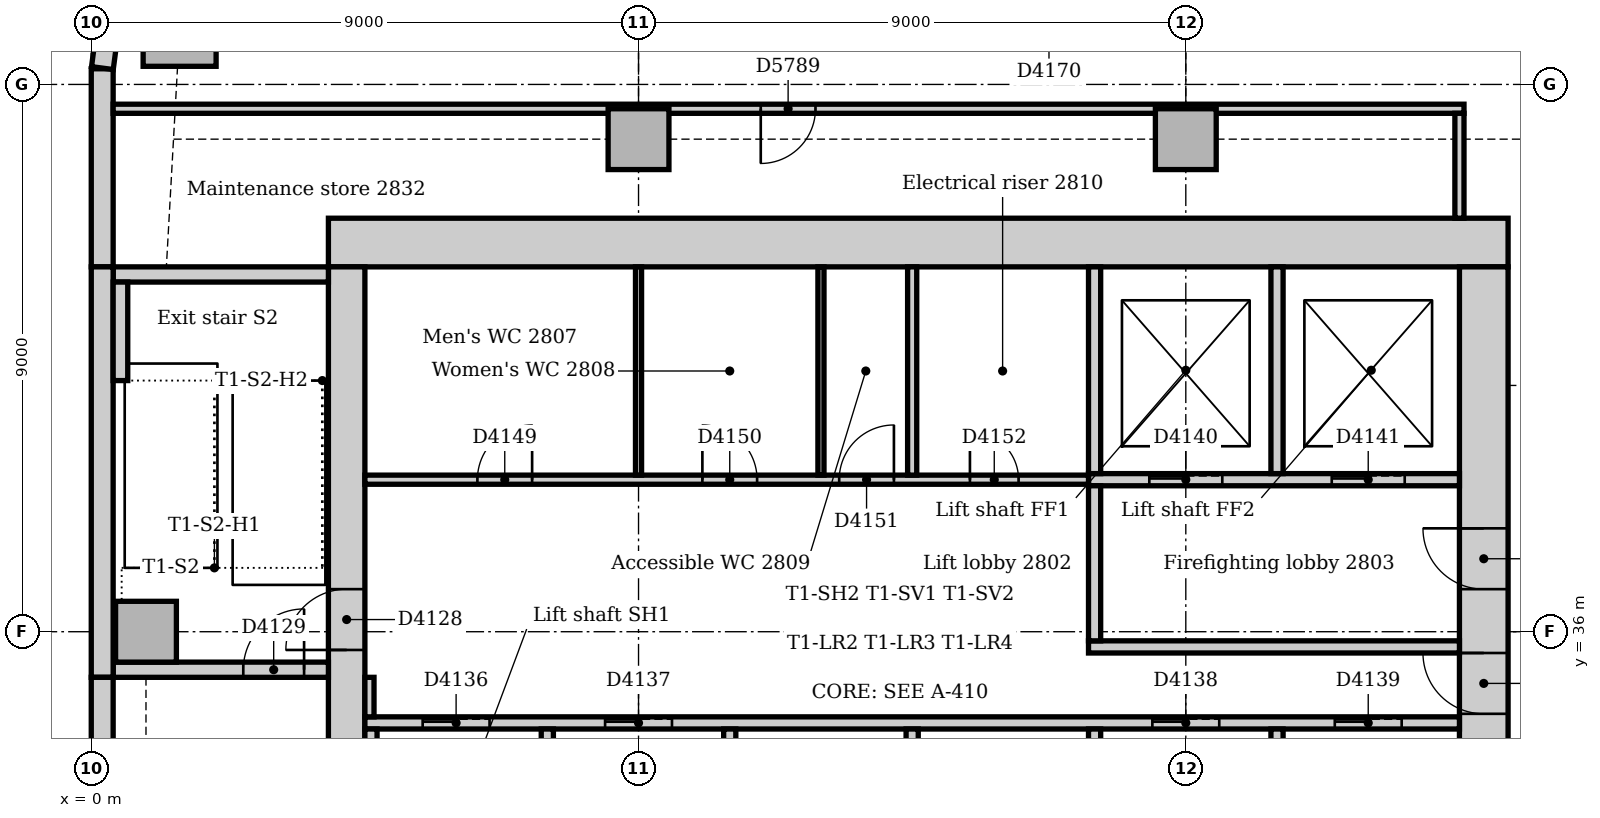
"""IFC4 building model, lengths in metres.
Left out: names, types, materials, properties, quantities, classifications, styles, units other than length and angle.
Written with IfcOpenShell. Run it as: python <this file> out.ifc"""

import sys

from ifc_helpers import new_model, si_unit, direction, frame, frame_2d, origin, origin_2d, place, context, subcontext, project, spatial, rectangle, extrude, element, fill, save


model = new_model("IFC4")
c1 = context("Model", 3, precision=1e-05, world=origin(), true_north=direction((0.0, 1.0)))
c2 = subcontext(c1, "Body", "Model", "MODEL_VIEW")
j1 = project(units=[si_unit("LENGTHUNIT", "METRE"), si_unit("PLANEANGLEUNIT", "RADIAN")], contexts=[c1])
p1 = place(None, origin())
s1 = spatial("IfcSite", under=j1, at=p1, CompositionType="ELEMENT")
p2 = place(p1, origin())
s2 = spatial("IfcBuilding", under=s1, at=p2, CompositionType="ELEMENT")
p3 = place(p2, frame((0.0, 0.0, 120.0)))
s3 = spatial("IfcBuildingStorey", under=s2, at=p3, CompositionType="ELEMENT", Elevation=120.0)
p4 = place(p3, frame((23.3, 42.4, 0.0), z_axis=(0.0, 0.0, 1.0), x_axis=(-1.0, 0.0, 0.0)))
e1 = element("IfcWall", 1, at=p4, inside=s3, PredefinedType="SOLIDWALL", context=c2, shape_type="SweptSolid", body=[
    extrude(rectangle(XDim=19.4, YDim=0.8, at=frame_2d((9.7, 0.0))), origin(), (0.0, 0.0, 1.0), 4.0),
])
p5 = place(p3, frame((22.9, 31.5, 0.0), z_axis=(0.0, 0.0, 1.0), x_axis=(0.0, 1.0, 0.0)))
e2 = element("IfcWall", 2, at=p5, inside=s3, PredefinedType="SOLIDWALL", context=c2, shape_type="SweptSolid", body=[
    extrude(rectangle(XDim=10.5, YDim=0.8, at=frame_2d((5.25, 0.0))), origin(), (0.0, 0.0, 1.0), 4.0),
])
p6 = place(p5, frame((3.15, 0.0, 0.0)))
e3 = element("IfcOpeningElement", 3, at=p6, cuts=e2, PredefinedType="OPENING", context=c2, shape_type="SweptSolid", body=[
    extrude(rectangle(XDim=1.0, YDim=2.1, at=frame_2d((0.5, 1.05))), frame((0.0, 0.41, 0.0), z_axis=(0.0, -1.0, 0.0), x_axis=(1.0, 0.0, 0.0)), (0.0, 0.0, 1.0), 0.82),
])
p7 = place(p5, frame((5.2, 0.0, 0.0)))
e4 = element("IfcOpeningElement", 4, at=p7, cuts=e2, PredefinedType="OPENING", context=c2, shape_type="SweptSolid", body=[
    extrude(rectangle(XDim=1.0, YDim=2.1, at=frame_2d((0.5, 1.05))), frame((0.0, 0.41, 0.0), z_axis=(0.0, -1.0, 0.0), x_axis=(1.0, 0.0, 0.0)), (0.0, 0.0, 1.0), 0.82),
])
p8 = place(p3, frame((4.2, 42.0, 0.0), z_axis=(0.0, 0.0, 1.0), x_axis=(0.0, -1.0, 0.0)))
e5 = element("IfcWall", 5, at=p8, inside=s3, PredefinedType="SOLIDWALL", context=c2, shape_type="SweptSolid", body=[
    extrude(rectangle(XDim=10.5, YDim=0.6, at=frame_2d((5.25, 0.0))), origin(), (0.0, 0.0, 1.0), 4.0),
])
p9 = place(p8, frame((5.3, 0.0, 0.0)))
e6 = element("IfcOpeningElement", 6, at=p9, cuts=e5, PredefinedType="OPENING", context=c2, shape_type="SweptSolid", body=[
    extrude(rectangle(XDim=1.0, YDim=2.1, at=frame_2d((0.5, 1.05))), frame((0.0, 0.31, 0.0), z_axis=(0.0, -1.0, 0.0), x_axis=(1.0, 0.0, 0.0)), (0.0, 0.0, 1.0), 0.62),
])
p10 = place(p3, frame((0.36, 35.375, 0.0), z_axis=(0.0, 0.0, 1.0), x_axis=(1.0, 0.0, 0.0)))
e7 = element("IfcWall", 7, at=p10, inside=s3, PredefinedType="SOLIDWALL", context=c2, shape_type="SweptSolid", body=[
    extrude(rectangle(XDim=3.54, YDim=0.25, at=frame_2d((1.77, 0.0))), origin(), (0.0, 0.0, 1.0), 4.0),
])
p11 = place(p10, frame((2.14, 0.0, 0.0)))
e8 = element("IfcOpeningElement", 8, at=p11, cuts=e7, PredefinedType="OPENING", context=c2, shape_type="SweptSolid", body=[
    extrude(rectangle(XDim=1.0, YDim=2.1, at=frame_2d((0.5, 1.05))), frame((0.0, 0.135, 0.0), z_axis=(0.0, -1.0, 0.0), x_axis=(1.0, 0.0, 0.0)), (0.0, 0.0, 1.0), 0.27),
])
p12 = place(p3, frame((3.9, 41.875, 0.0), z_axis=(0.0, 0.0, 1.0), x_axis=(-1.0, 0.0, 0.0)))
e9 = element("IfcWall", 9, at=p12, inside=s3, PredefinedType="SOLIDWALL", context=c2, shape_type="SweptSolid", body=[
    extrude(rectangle(XDim=3.54, YDim=0.25, at=frame_2d((1.77, 0.0))), origin(), (0.0, 0.0, 1.0), 4.0),
])
p13 = place(p3, frame((1.453, 45.898, 0.0), z_axis=(0.0, 0.0, 1.0), x_axis=(1.0, 0.0, 0.0)))
e10 = element("IfcColumn", 10, at=p13, inside=s3, PredefinedType="COLUMN", context=c2, shape_type="SweptSolid", body=[
    extrude(rectangle(XDim=1.2, YDim=1.2, at=origin_2d()), origin(), (0.0, 0.0, 1.0), 3.85),
])
p14 = place(p3, frame((0.9, 36.0, 0.0), z_axis=(0.0, 0.0, 1.0), x_axis=(1.0, 0.0, 0.0)))
e11 = element("IfcColumn", 11, at=p14, inside=s3, PredefinedType="COLUMN", context=c2, shape_type="SweptSolid", body=[
    extrude(rectangle(XDim=1.0, YDim=1.0, at=origin_2d()), origin(), (0.0, 0.0, 1.0), 4.0),
])
for number, where, z_axis, x_axis in (
    (12, (9.0, 44.1, 0.0), (0.0, 0.0, 1.0), (1.0, 0.0, 0.0)),
    (13, (18.0, 44.1, 0.0), (0.0, 0.0, 1.0), (1.0, 0.0, 0.0)),
):
    element("IfcColumn", number, at=place(p3, frame(where, z_axis=z_axis, x_axis=x_axis)), inside=s3, PredefinedType="COLUMN", context=c2, shape_type="SweptSolid", body=[
        extrude(rectangle(XDim=1.0, YDim=1.0, at=origin_2d()), origin(), (0.0, 0.0, 1.0), 3.85),
    ])
p15 = place(p3, frame((0.18, 45.257, 0.0), z_axis=(0.0, 0.0, 1.0), x_axis=(0.0, -1.0, 0.0)))
e14 = element("IfcWall", 14, at=p15, inside=s3, PredefinedType="STANDARD", context=c2, shape_type="SweptSolid", body=[
    extrude(rectangle(XDim=3.257, YDim=0.36, at=frame_2d((1.629, 0.0))), origin(), (0.0, 0.0, 1.0), 3.85),
])
p16 = place(p3, frame((0.18, 42.0, 0.0), z_axis=(0.0, 0.0, 1.0), x_axis=(0.0, -1.0, 0.0)))
e15 = element("IfcWall", 15, at=p16, inside=s3, PredefinedType="STANDARD", context=c2, shape_type="SweptSolid", body=[
    extrude(rectangle(XDim=6.75, YDim=0.36, at=frame_2d((3.375, 0.0))), origin(), (0.0, 0.0, 1.0), 3.85),
])
p17 = place(p3, frame((0.18, 35.25, 0.0), z_axis=(0.0, 0.0, 1.0), x_axis=(0.0, -1.0, 0.0)))
e16 = element("IfcWall", 16, at=p17, inside=s3, PredefinedType="STANDARD", context=c2, shape_type="SweptSolid", body=[
    extrude(rectangle(XDim=7.5, YDim=0.36, at=frame_2d((3.75, 0.0))), origin(), (0.0, 0.0, 1.0), 3.85),
])
p18 = place(p3, frame((0.276, 45.976, 0.0), z_axis=(0.0, 0.0, 1.0), x_axis=(-0.13055608231, -0.99144092581, 0.0)))
e17 = element("IfcWall", 17, at=p18, inside=s3, PredefinedType="STANDARD", context=c2, shape_type="SweptSolid", body=[
    extrude(rectangle(XDim=0.713, YDim=0.36, at=frame_2d((0.356, 0.0))), origin(), (0.0, 0.0, 1.0), 3.85),
])
p19 = place(p3, frame((0.48, 40.13, 0.0), z_axis=(0.0, 0.0, 1.0), x_axis=(0.0, 1.0, 0.0)))
e18 = element("IfcWall", 18, at=p19, inside=s3, PredefinedType="STANDARD", context=c2, shape_type="SweptSolid", body=[
    extrude(rectangle(XDim=1.62, YDim=0.24, at=frame_2d((0.81, 0.0))), origin(), (0.0, 0.0, 1.0), 4.0),
])
p20 = place(p3, frame((16.4, 35.75, 0.0), z_axis=(0.0, 0.0, 1.0), x_axis=(1.0, 0.0, 0.0)))
e19 = element("IfcWall", 19, at=p20, inside=s3, PredefinedType="PARTITIONING", context=c2, shape_type="SweptSolid", body=[
    extrude(rectangle(XDim=6.1, YDim=0.2, at=frame_2d((3.05, 0.0))), origin(), (0.0, 0.0, 1.0), 3.85),
])
p21 = place(p3, frame((16.4, 38.5, 0.0), z_axis=(0.0, 0.0, 1.0), x_axis=(1.0, 0.0, 0.0)))
e20 = element("IfcWall", 20, at=p21, inside=s3, PredefinedType="PARTITIONING", context=c2, shape_type="SweptSolid", body=[
    extrude(rectangle(XDim=6.1, YDim=0.2, at=frame_2d((3.05, 0.0))), origin(), (0.0, 0.0, 1.0), 3.85),
])
p22 = place(p21, frame((1.0, 0.0, 0.0)))
e21 = element("IfcOpeningElement", 21, at=p22, cuts=e20, PredefinedType="OPENING", context=c2, shape_type="SweptSolid", body=[
    extrude(rectangle(XDim=1.2, YDim=2.1, at=frame_2d((0.6, 1.05))), frame((0.0, 0.11, 0.0), z_axis=(0.0, -1.0, 0.0), x_axis=(1.0, 0.0, 0.0)), (0.0, 0.0, 1.0), 0.22),
])
p23 = place(p21, frame((4.0, 0.0, 0.0)))
e22 = element("IfcOpeningElement", 22, at=p23, cuts=e20, PredefinedType="OPENING", context=c2, shape_type="SweptSolid", body=[
    extrude(rectangle(XDim=1.2, YDim=2.1, at=frame_2d((0.6, 1.05))), frame((0.0, 0.11, 0.0), z_axis=(0.0, -1.0, 0.0), x_axis=(1.0, 0.0, 0.0)), (0.0, 0.0, 1.0), 0.22),
])
p24 = place(p3, frame((16.5, 35.85, 0.0), z_axis=(0.0, 0.0, 1.0), x_axis=(0.0, 1.0, 0.0)))
e23 = element("IfcWall", 23, at=p24, inside=s3, PredefinedType="PARTITIONING", context=c2, shape_type="SweptSolid", body=[
    extrude(rectangle(XDim=2.55, YDim=0.2, at=frame_2d((1.275, 0.0))), origin(), (0.0, 0.0, 1.0), 3.85),
])
p25 = place(p3, frame((4.5, 34.5, 0.0), z_axis=(0.0, 0.0, 1.0), x_axis=(1.0, 0.0, 0.0)))
e24 = element("IfcWall", 24, at=p25, inside=s3, PredefinedType="PARTITIONING", context=c2, shape_type="SweptSolid", body=[
    extrude(rectangle(XDim=18.0, YDim=0.2, at=frame_2d((9.0, 0.0))), origin(), (0.0, 0.0, 1.0), 3.85),
])
p26 = place(p25, frame((0.95, 0.0, 0.0)))
e25 = element("IfcOpeningElement", 25, at=p26, cuts=e24, PredefinedType="OPENING", context=c2, shape_type="SweptSolid", body=[
    extrude(rectangle(XDim=1.1, YDim=2.1, at=frame_2d((0.55, 1.05))), frame((0.0, 0.11, 0.0), z_axis=(0.0, -1.0, 0.0), x_axis=(1.0, 0.0, 0.0)), (0.0, 0.0, 1.0), 0.22),
])
p27 = place(p25, frame((3.95, 0.0, 0.0)))
e26 = element("IfcOpeningElement", 26, at=p27, cuts=e24, PredefinedType="OPENING", context=c2, shape_type="SweptSolid", body=[
    extrude(rectangle(XDim=1.1, YDim=2.1, at=frame_2d((0.55, 1.05))), frame((0.0, 0.11, 0.0), z_axis=(0.0, -1.0, 0.0), x_axis=(1.0, 0.0, 0.0)), (0.0, 0.0, 1.0), 0.22),
])
p28 = place(p25, frame((12.95, 0.0, 0.0)))
e27 = element("IfcOpeningElement", 27, at=p28, cuts=e24, PredefinedType="OPENING", context=c2, shape_type="SweptSolid", body=[
    extrude(rectangle(XDim=1.1, YDim=2.1, at=frame_2d((0.55, 1.05))), frame((0.0, 0.11, 0.0), z_axis=(0.0, -1.0, 0.0), x_axis=(1.0, 0.0, 0.0)), (0.0, 0.0, 1.0), 0.22),
])
p29 = place(p25, frame((15.95, 0.0, 0.0)))
e28 = element("IfcOpeningElement", 28, at=p29, cuts=e24, PredefinedType="OPENING", context=c2, shape_type="SweptSolid", body=[
    extrude(rectangle(XDim=1.1, YDim=2.1, at=frame_2d((0.55, 1.05))), frame((0.0, 0.11, 0.0), z_axis=(0.0, -1.0, 0.0), x_axis=(1.0, 0.0, 0.0)), (0.0, 0.0, 1.0), 0.22),
])
for number, where, z_axis, x_axis in (
    (29, (16.5, 38.6, 0.0), (0.0, 0.0, 1.0), (0.0, 1.0, 0.0)),
    (30, (19.5, 38.6, 0.0), (0.0, 0.0, 1.0), (0.0, 1.0, 0.0)),
):
    element("IfcWall", number, at=place(p3, frame(where, z_axis=z_axis, x_axis=x_axis)), inside=s3, PredefinedType="PARTITIONING", context=c2, shape_type="SweptSolid", body=[
        extrude(rectangle(XDim=3.4, YDim=0.2, at=frame_2d((1.7, 0.0))), origin(), (0.0, 0.0, 1.0), 3.85),
    ])
for number, where, z_axis, x_axis in (
    (31, (4.6, 31.75, 0.0), (0.0, 0.0, 1.0), (0.0, 1.0, 0.0)),
    (32, (7.5, 31.75, 0.0), (0.0, 0.0, 1.0), (0.0, 1.0, 0.0)),
    (33, (10.5, 31.75, 0.0), (0.0, 0.0, 1.0), (0.0, 1.0, 0.0)),
    (34, (13.5, 31.75, 0.0), (0.0, 0.0, 1.0), (0.0, 1.0, 0.0)),
    (35, (16.5, 31.75, 0.0), (0.0, 0.0, 1.0), (0.0, 1.0, 0.0)),
    (36, (19.5, 31.75, 0.0), (0.0, 0.0, 1.0), (0.0, 1.0, 0.0)),
):
    element("IfcWall", number, at=place(p3, frame(where, z_axis=z_axis, x_axis=x_axis)), inside=s3, PredefinedType="PARTITIONING", context=c2, shape_type="SweptSolid", body=[
        extrude(rectangle(XDim=2.65, YDim=0.2, at=frame_2d((1.325, 0.0))), origin(), (0.0, 0.0, 1.0), 3.85),
    ])
p30 = place(p3, frame((0.36, 44.6, 0.0), z_axis=(0.0, 0.0, 1.0), x_axis=(1.0, 0.0, 0.0)))
e37 = element("IfcWall", 37, at=p30, inside=s3, PredefinedType="PARTITIONING", context=c2, shape_type="SweptSolid", body=[
    extrude(rectangle(XDim=22.215, YDim=0.15, at=frame_2d((11.107, 0.0))), origin(), (0.0, 0.0, 1.0), 3.85),
])
p31 = place(p30, frame((10.65, 0.0, 0.0)))
e38 = element("IfcOpeningElement", 38, at=p31, cuts=e37, PredefinedType="OPENING", context=c2, shape_type="SweptSolid", body=[
    extrude(rectangle(XDim=0.9, YDim=2.1, at=frame_2d((0.45, 1.05))), frame((0.0, 0.085, 0.0), z_axis=(0.0, -1.0, 0.0), x_axis=(1.0, 0.0, 0.0)), (0.0, 0.0, 1.0), 0.17),
])
p32 = place(p3, frame((4.5, 38.5, 0.0), z_axis=(0.0, 0.0, 1.0), x_axis=(1.0, 0.0, 0.0)))
e39 = element("IfcWall", 39, at=p32, inside=s3, PredefinedType="PARTITIONING", context=c2, shape_type="SweptSolid", body=[
    extrude(rectangle(XDim=11.9, YDim=0.15, at=frame_2d((5.95, 0.0))), origin(), (0.0, 0.0, 1.0), 3.85),
])
p33 = place(p32, frame((1.85, 0.0, 0.0)))
e40 = element("IfcOpeningElement", 40, at=p33, cuts=e39, PredefinedType="OPENING", context=c2, shape_type="SweptSolid", body=[
    extrude(rectangle(XDim=0.9, YDim=2.1, at=frame_2d((0.45, 1.05))), frame((0.0, 0.085, 0.0), z_axis=(0.0, -1.0, 0.0), x_axis=(1.0, 0.0, 0.0)), (0.0, 0.0, 1.0), 0.17),
])
p34 = place(p32, frame((5.55, 0.0, 0.0)))
e41 = element("IfcOpeningElement", 41, at=p34, cuts=e39, PredefinedType="OPENING", context=c2, shape_type="SweptSolid", body=[
    extrude(rectangle(XDim=0.9, YDim=2.1, at=frame_2d((0.45, 1.05))), frame((0.0, 0.085, 0.0), z_axis=(0.0, -1.0, 0.0), x_axis=(1.0, 0.0, 0.0)), (0.0, 0.0, 1.0), 0.17),
])
p35 = place(p32, frame((7.8, 0.0, 0.0)))
e42 = element("IfcOpeningElement", 42, at=p35, cuts=e39, PredefinedType="OPENING", context=c2, shape_type="SweptSolid", body=[
    extrude(rectangle(XDim=0.9, YDim=2.1, at=frame_2d((0.45, 1.05))), frame((0.0, 0.085, 0.0), z_axis=(0.0, -1.0, 0.0), x_axis=(1.0, 0.0, 0.0)), (0.0, 0.0, 1.0), 0.17),
])
p36 = place(p32, frame((9.95, 0.0, 0.0)))
e43 = element("IfcOpeningElement", 43, at=p36, cuts=e39, PredefinedType="OPENING", context=c2, shape_type="SweptSolid", body=[
    extrude(rectangle(XDim=0.8, YDim=2.1, at=frame_2d((0.4, 1.05))), frame((0.0, 0.085, 0.0), z_axis=(0.0, -1.0, 0.0), x_axis=(1.0, 0.0, 0.0)), (0.0, 0.0, 1.0), 0.17),
])
p37 = place(p3, frame((22.5, 42.8, 0.0), z_axis=(0.0, 0.0, 1.0), x_axis=(0.0, 1.0, 0.0)))
e44 = element("IfcWall", 44, at=p37, inside=s3, PredefinedType="PARTITIONING", context=c2, shape_type="SweptSolid", body=[
    extrude(rectangle(XDim=1.725, YDim=0.15, at=frame_2d((0.863, 0.0))), origin(), (0.0, 0.0, 1.0), 3.85),
])
p38 = place(p3, frame((4.575, 34.6, 0.0), z_axis=(0.0, 0.0, 1.0), x_axis=(0.0, 1.0, 0.0)))
e45 = element("IfcWall", 45, at=p38, inside=s3, PredefinedType="PARTITIONING", context=c2, shape_type="SweptSolid", body=[
    extrude(rectangle(XDim=0.65, YDim=0.15, at=frame_2d((0.325, 0.0))), origin(), (0.0, 0.0, 1.0), 3.85),
])
p39 = place(p3, frame((13.5, 38.575, 0.0), z_axis=(0.0, 0.0, 1.0), x_axis=(0.0, 1.0, 0.0)))
e46 = element("IfcWall", 46, at=p39, inside=s3, PredefinedType="PARTITIONING", context=c2, shape_type="SweptSolid", body=[
    extrude(rectangle(XDim=3.425, YDim=0.15, at=frame_2d((1.712, 0.0))), origin(), (0.0, 0.0, 1.0), 3.85),
])
for number, where, z_axis, x_axis in (
    (47, (9.0, 38.575, 0.0), (0.0, 0.0, 1.0), (0.0, 1.0, 0.0)),
    (48, (12.0, 38.575, 0.0), (0.0, 0.0, 1.0), (0.0, 1.0, 0.0)),
):
    element("IfcWall", number, at=place(p3, frame(where, z_axis=z_axis, x_axis=x_axis)), inside=s3, PredefinedType="PARTITIONING", context=c2, shape_type="SweptSolid", body=[
        extrude(rectangle(XDim=3.425, YDim=0.1, at=frame_2d((1.712, 0.0))), origin(), (0.0, 0.0, 1.0), 3.85),
    ])
p40 = place(p9, frame((1.0, 0.0, 0.0), z_axis=(0.0, 0.0, 1.0), x_axis=(-1.0, 0.0, 0.0)))
e49 = element("IfcDoor", 49, at=p40, inside=s3, OperationType="SINGLE_SWING_LEFT", PredefinedType="DOOR", context=c2, shape_type="SweptSolid", body=[
    extrude(rectangle(XDim=1.0, YDim=2.1, at=frame_2d((0.5, 1.05))), frame((0.0, 0.025, 0.0), z_axis=(0.0, -1.0, 0.0), x_axis=(1.0, 0.0, 0.0)), (0.0, 0.0, 1.0), 0.05),
])
fill(e6, e49)
p41 = place(p11, origin())
e50 = element("IfcDoor", 50, at=p41, inside=s3, OperationType="SINGLE_SWING_RIGHT", PredefinedType="DOOR", context=c2, shape_type="SweptSolid", body=[
    extrude(rectangle(XDim=1.0, YDim=2.1, at=frame_2d((0.5, 1.05))), frame((0.0, 0.025, 0.0), z_axis=(0.0, -1.0, 0.0), x_axis=(1.0, 0.0, 0.0)), (0.0, 0.0, 1.0), 0.05),
])
fill(e8, e50)
p42 = place(p26, origin())
e51 = element("IfcDoor", 51, at=p42, inside=s3, OperationType="SLIDING_TO_LEFT", PredefinedType="DOOR", context=c2, shape_type="SweptSolid", body=[
    extrude(rectangle(XDim=1.1, YDim=2.1, at=frame_2d((0.55, 1.05))), frame((0.0, 0.025, 0.0), z_axis=(0.0, -1.0, 0.0), x_axis=(1.0, 0.0, 0.0)), (0.0, 0.0, 1.0), 0.05),
])
fill(e25, e51)
p43 = place(p27, origin())
e52 = element("IfcDoor", 52, at=p43, inside=s3, OperationType="SLIDING_TO_LEFT", PredefinedType="DOOR", context=c2, shape_type="SweptSolid", body=[
    extrude(rectangle(XDim=1.1, YDim=2.1, at=frame_2d((0.55, 1.05))), frame((0.0, 0.025, 0.0), z_axis=(0.0, -1.0, 0.0), x_axis=(1.0, 0.0, 0.0)), (0.0, 0.0, 1.0), 0.05),
])
fill(e26, e52)
p44 = place(p28, origin())
e53 = element("IfcDoor", 53, at=p44, inside=s3, OperationType="SLIDING_TO_LEFT", PredefinedType="DOOR", context=c2, shape_type="SweptSolid", body=[
    extrude(rectangle(XDim=1.1, YDim=2.1, at=frame_2d((0.55, 1.05))), frame((0.0, 0.025, 0.0), z_axis=(0.0, -1.0, 0.0), x_axis=(1.0, 0.0, 0.0)), (0.0, 0.0, 1.0), 0.05),
])
fill(e27, e53)
p45 = place(p29, origin())
e54 = element("IfcDoor", 54, at=p45, inside=s3, OperationType="SLIDING_TO_LEFT", PredefinedType="DOOR", context=c2, shape_type="SweptSolid", body=[
    extrude(rectangle(XDim=1.1, YDim=2.1, at=frame_2d((0.55, 1.05))), frame((0.0, 0.025, 0.0), z_axis=(0.0, -1.0, 0.0), x_axis=(1.0, 0.0, 0.0)), (0.0, 0.0, 1.0), 0.05),
])
fill(e28, e54)
p46 = place(p22, origin())
e55 = element("IfcDoor", 55, at=p46, inside=s3, OperationType="SLIDING_TO_LEFT", PredefinedType="DOOR", context=c2, shape_type="SweptSolid", body=[
    extrude(rectangle(XDim=1.2, YDim=2.1, at=frame_2d((0.6, 1.05))), frame((0.0, 0.025, 0.0), z_axis=(0.0, -1.0, 0.0), x_axis=(1.0, 0.0, 0.0)), (0.0, 0.0, 1.0), 0.05),
])
fill(e21, e55)
p47 = place(p23, origin())
e56 = element("IfcDoor", 56, at=p47, inside=s3, OperationType="SLIDING_TO_LEFT", PredefinedType="DOOR", context=c2, shape_type="SweptSolid", body=[
    extrude(rectangle(XDim=1.2, YDim=2.1, at=frame_2d((0.6, 1.05))), frame((0.0, 0.025, 0.0), z_axis=(0.0, -1.0, 0.0), x_axis=(1.0, 0.0, 0.0)), (0.0, 0.0, 1.0), 0.05),
])
fill(e22, e56)
p48 = place(p6, origin())
e57 = element("IfcDoor", 57, at=p48, inside=s3, OperationType="SINGLE_SWING_RIGHT", PredefinedType="DOOR", context=c2, shape_type="SweptSolid", body=[
    extrude(rectangle(XDim=1.0, YDim=2.1, at=frame_2d((0.5, 1.05))), frame((0.0, 0.025, 0.0), z_axis=(0.0, -1.0, 0.0), x_axis=(1.0, 0.0, 0.0)), (0.0, 0.0, 1.0), 0.05),
])
fill(e3, e57)
p49 = place(p7, origin())
e58 = element("IfcDoor", 58, at=p49, inside=s3, OperationType="SINGLE_SWING_RIGHT", PredefinedType="DOOR", context=c2, shape_type="SweptSolid", body=[
    extrude(rectangle(XDim=1.0, YDim=2.1, at=frame_2d((0.5, 1.05))), frame((0.0, 0.025, 0.0), z_axis=(0.0, -1.0, 0.0), x_axis=(1.0, 0.0, 0.0)), (0.0, 0.0, 1.0), 0.05),
])
fill(e4, e58)
p50 = place(p33, origin())
e59 = element("IfcDoor", 59, at=p50, inside=s3, OperationType="SINGLE_SWING_RIGHT", PredefinedType="DOOR", context=c2, shape_type="SweptSolid", body=[
    extrude(rectangle(XDim=0.9, YDim=2.1, at=frame_2d((0.45, 1.05))), frame((0.0, 0.025, 0.0), z_axis=(0.0, -1.0, 0.0), x_axis=(1.0, 0.0, 0.0)), (0.0, 0.0, 1.0), 0.05),
])
fill(e40, e59)
p51 = place(p34, origin())
e60 = element("IfcDoor", 60, at=p51, inside=s3, OperationType="SINGLE_SWING_LEFT", PredefinedType="DOOR", context=c2, shape_type="SweptSolid", body=[
    extrude(rectangle(XDim=0.9, YDim=2.1, at=frame_2d((0.45, 1.05))), frame((0.0, 0.025, 0.0), z_axis=(0.0, -1.0, 0.0), x_axis=(1.0, 0.0, 0.0)), (0.0, 0.0, 1.0), 0.05),
])
fill(e41, e60)
p52 = place(p35, origin())
e61 = element("IfcDoor", 61, at=p52, inside=s3, OperationType="SINGLE_SWING_RIGHT", PredefinedType="DOOR", context=c2, shape_type="SweptSolid", body=[
    extrude(rectangle(XDim=0.9, YDim=2.1, at=frame_2d((0.45, 1.05))), frame((0.0, 0.025, 0.0), z_axis=(0.0, -1.0, 0.0), x_axis=(1.0, 0.0, 0.0)), (0.0, 0.0, 1.0), 0.05),
])
fill(e42, e61)
p53 = place(p36, origin())
e62 = element("IfcDoor", 62, at=p53, inside=s3, OperationType="SINGLE_SWING_LEFT", PredefinedType="DOOR", context=c2, shape_type="SweptSolid", body=[
    extrude(rectangle(XDim=0.8, YDim=2.1, at=frame_2d((0.4, 1.05))), frame((0.0, 0.025, 0.0), z_axis=(0.0, -1.0, 0.0), x_axis=(1.0, 0.0, 0.0)), (0.0, 0.0, 1.0), 0.05),
])
fill(e43, e62)
p54 = place(p31, frame((0.9, 0.0, 0.0), z_axis=(0.0, 0.0, 1.0), x_axis=(-1.0, 0.0, 0.0)))
e63 = element("IfcDoor", 63, at=p54, inside=s3, OperationType="SINGLE_SWING_RIGHT", PredefinedType="DOOR", context=c2, shape_type="SweptSolid", body=[
    extrude(rectangle(XDim=0.9, YDim=2.1, at=frame_2d((0.45, 1.05))), frame((0.0, 0.025, 0.0), z_axis=(0.0, -1.0, 0.0), x_axis=(1.0, 0.0, 0.0)), (0.0, 0.0, 1.0), 0.05),
])
fill(e38, e63)
save(model, sys.argv[1])
